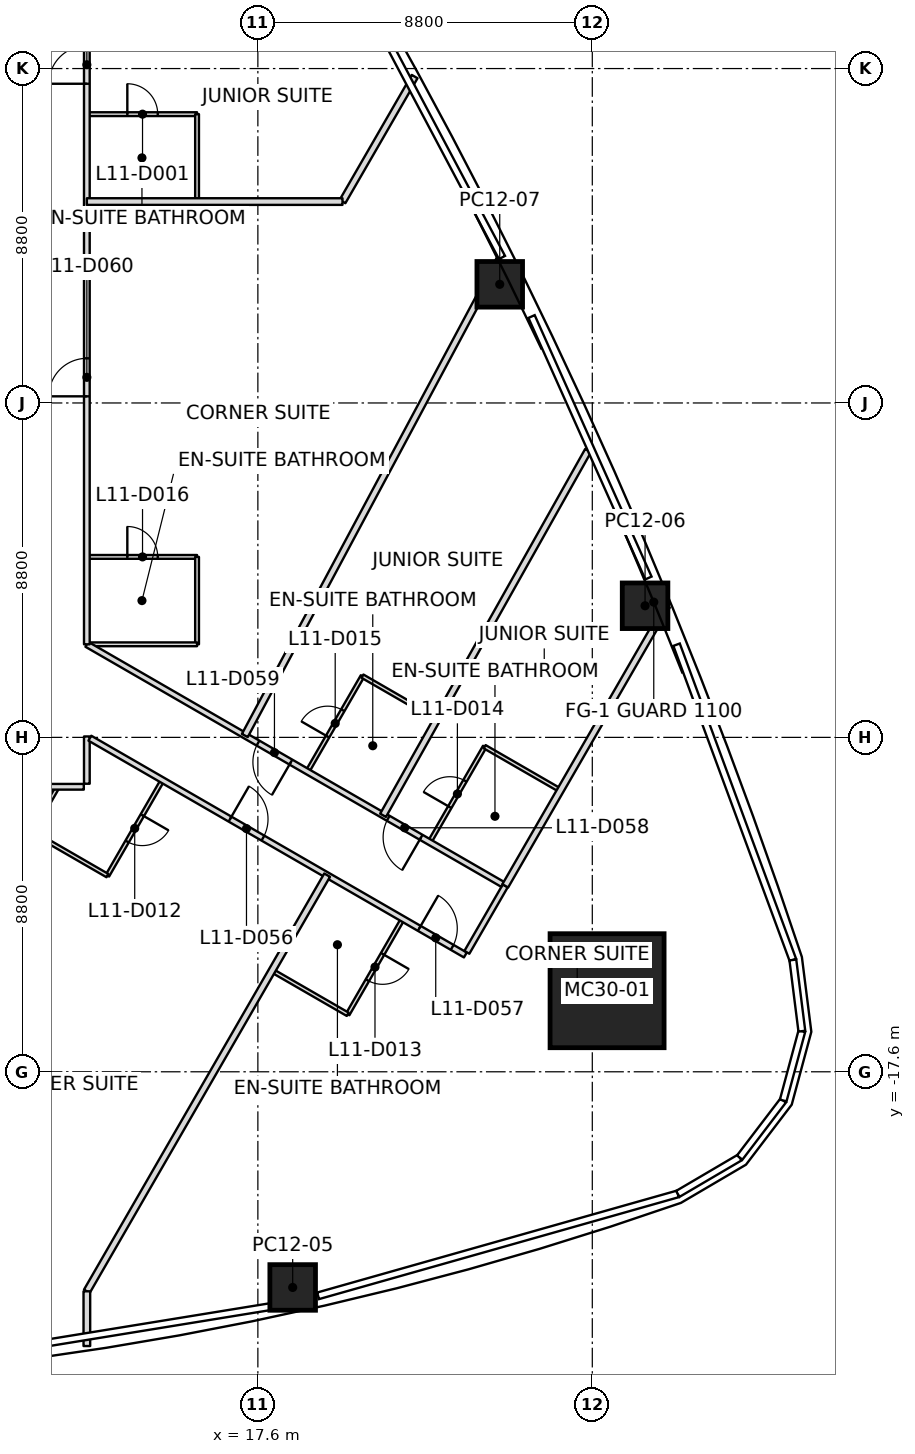
"""IFC4 building model, lengths in metres.
Left out: names, types, materials, properties, quantities, classifications, styles, units other than length and angle.
Written with IfcOpenShell. Run it as: python <this file> out.ifc"""

import sys

from ifc_helpers import new_model, si_unit, direction, frame, frame_2d, origin, origin_2d, place, context, subcontext, project, spatial, rectangle, extrude, clip, halfspace, element, fill, save


model = new_model("IFC4")
c1 = context("Model", 3, precision=1e-05, world=origin(), true_north=direction((0.0, 1.0)))
c2 = subcontext(c1, "Body", "Model", "MODEL_VIEW")
j1 = project(units=[si_unit("LENGTHUNIT", "METRE"), si_unit("PLANEANGLEUNIT", "RADIAN")], contexts=[c1])
p1 = place(None, origin())
s1 = spatial("IfcSite", under=j1, at=p1, CompositionType="ELEMENT")
p2 = place(p1, origin())
s2 = spatial("IfcBuilding", under=s1, at=p2, CompositionType="ELEMENT")
p3 = place(p2, frame((0.0, 0.0, 62.8)))
s3 = spatial("IfcBuildingStorey", under=s2, at=p3, CompositionType="ELEMENT", Elevation=62.8)
p4 = place(p3, frame((26.789, -15.467, 0.0), z_axis=(-0.030531992032, 0.017607001884, 0.999378702468), x_axis=(0.999533790055, 0.000537827582, 0.03052725469)))
e1 = element("IfcColumn", 1, at=p4, inside=s3, PredefinedType="COLUMN", context=c2, shape_type="SweptSolid", body=[
    extrude(rectangle(XDim=3.0, YDim=3.0, at=origin_2d()), origin(), (0.0, 0.0, 1.0), 3.702),
])
p5 = place(p3, frame((18.516, -23.275, 0.0), z_axis=(-0.019035359056, 0.17391691533, 0.98457633613), x_axis=(0.976521539024, 0.214578146302, -0.019023747061)))
e2 = element("IfcColumn", 2, at=p5, inside=s3, PredefinedType="COLUMN", context=c2, shape_type="SweptSolid", body=[
    clip(clip(extrude(rectangle(XDim=1.2, YDim=1.2, at=origin_2d()), origin(), (0.0, 0.0, 1.0), 3.758), halfspace(frame((0.0, 0.0, 0.0)), True)), halfspace(frame((0.0, 0.0, 3.752)), False)),
])
p6 = place(p3, frame((27.788, -5.337, 0.0), z_axis=(-0.019460655113, 0.011016709844, 0.999749926235), x_axis=(-0.381541837416, 0.924183792164, -0.017610922819)))
e3 = element("IfcColumn", 3, at=p6, inside=s3, PredefinedType="COLUMN", context=c2, shape_type="SweptSolid", body=[
    extrude(rectangle(XDim=1.2, YDim=1.2, at=origin_2d()), origin(), (0.0, 0.0, 1.0), 3.701),
])
p7 = place(p3, frame((23.965, 3.122, 0.0), z_axis=(-0.015372606146, 0.002309189764, 0.999879168011), x_axis=(-0.441716721862, 0.89711079847, -0.008863007202)))
e4 = element("IfcColumn", 4, at=p7, inside=s3, PredefinedType="COLUMN", context=c2, shape_type="SweptSolid", body=[
    extrude(rectangle(XDim=1.2, YDim=1.2, at=origin_2d()), origin(), (0.0, 0.0, 1.0), 3.7),
])
p8 = place(p3, frame((19.422, -12.426, 0.0), z_axis=(0.0, 0.0, 1.0), x_axis=(-0.499984848557, -0.866034151298, 0.0)))
e5 = element("IfcWall", 5, at=p8, inside=s3, PredefinedType="PARTITIONING", context=c2, shape_type="SweptSolid", body=[
    extrude(rectangle(XDim=12.645, YDim=0.175, at=frame_2d((6.323, 0.0))), origin(), (0.0, 0.0, 1.0), 2.934),
])
p9 = place(p3, frame((13.1, -23.377, 0.0), z_axis=(0.0, 0.0, 1.0), x_axis=(0.0, -1.0, 0.0)))
e6 = element("IfcWall", 6, at=p9, inside=s3, PredefinedType="PARTITIONING", context=c2, shape_type="SweptSolid", body=[
    extrude(rectangle(XDim=1.44, YDim=0.175, at=frame_2d((0.72, 0.0))), origin(), (0.0, 0.0, 1.0), 2.934),
])
p10 = place(p3, frame((21.726, 8.589, 0.0), z_axis=(0.0, 0.0, 1.0), x_axis=(-0.500024807712, -0.866011080572, 0.0)))
e7 = element("IfcWall", 7, at=p10, inside=s3, PredefinedType="PARTITIONING", context=c2, shape_type="SweptSolid", body=[
    extrude(rectangle(XDim=3.798, YDim=0.175, at=frame_2d((1.899, 0.0))), origin(), (0.0, 0.0, 1.0), 2.934),
])
p11 = place(p3, frame((19.827, 5.3, 0.0), z_axis=(0.0, 0.0, 1.0), x_axis=(-1.0, 0.0, 0.0)))
e8 = element("IfcWall", 8, at=p11, inside=s3, PredefinedType="PARTITIONING", context=c2, shape_type="SweptSolid", body=[
    extrude(rectangle(XDim=6.727, YDim=0.175, at=frame_2d((3.363, 0.0))), origin(), (0.0, 0.0, 1.0), 3.093),
])
p12 = place(p3, frame((17.257, -8.751, 0.0), z_axis=(0.0, 0.0, 1.0), x_axis=(0.471767248767, 0.881723121502, 0.0)))
e9 = element("IfcWall", 9, at=p12, inside=s3, PredefinedType="PARTITIONING", context=c2, shape_type="SweptSolid", body=[
    extrude(rectangle(XDim=14.203, YDim=0.175, at=frame_2d((7.102, 0.0))), origin(), (0.0, 0.0, 1.0), 2.947),
])
p13 = place(p3, frame((20.894, -10.851, 0.0), z_axis=(0.0, 0.0, 1.0), x_axis=(0.489970665473, 0.871738921338, 0.0)))
e10 = element("IfcWall", 10, at=p13, inside=s3, PredefinedType="PARTITIONING", context=c2, shape_type="SweptSolid", body=[
    extrude(rectangle(XDim=11.011, YDim=0.175, at=frame_2d((5.505, 0.0))), origin(), (0.0, 0.0, 1.0), 2.934),
])
p14 = place(p3, frame((24.11, -12.707, 0.0), z_axis=(0.0, 0.0, 1.0), x_axis=(0.500004040168, 0.86602307118, 0.0)))
e11 = element("IfcWall", 11, at=p14, inside=s3, PredefinedType="PARTITIONING", context=c2, shape_type="SweptSolid", body=[
    extrude(rectangle(XDim=8.506, YDim=0.175, at=frame_2d((4.253, 0.0))), origin(), (0.0, 0.0, 1.0), 2.934),
])
p15 = place(p3, frame((-13.02, -10.1, 0.0), z_axis=(0.0, 0.0, 1.0), x_axis=(1.0, 0.0, 0.0)))
e12 = element("IfcWall", 12, at=p15, inside=s3, PredefinedType="PARTITIONING", context=c2, shape_type="SweptSolid", body=[
    extrude(rectangle(XDim=26.04, YDim=0.15, at=frame_2d((13.02, 0.0))), origin(), (0.0, 0.0, 1.0), 2.947),
])
p16 = place(p15, frame((4.02, 0.0, 0.0)))
e13 = element("IfcOpeningElement", 13, at=p16, cuts=e12, PredefinedType="OPENING", context=c2, shape_type="SweptSolid", body=[
    extrude(rectangle(XDim=1.0, YDim=2.1, at=frame_2d((0.5, 1.05))), frame((0.0, 0.075, 0.0), z_axis=(0.0, -1.0, 0.0), x_axis=(1.0, 0.0, 0.0)), (0.0, 0.0, 1.0), 0.15),
])
p17 = place(p15, frame((7.02, 0.0, 0.0)))
e14 = element("IfcOpeningElement", 14, at=p17, cuts=e12, PredefinedType="OPENING", context=c2, shape_type="SweptSolid", body=[
    extrude(rectangle(XDim=1.0, YDim=2.1, at=frame_2d((0.5, 1.05))), frame((0.0, 0.075, 0.0), z_axis=(0.0, -1.0, 0.0), x_axis=(1.0, 0.0, 0.0)), (0.0, 0.0, 1.0), 0.15),
])
p18 = place(p15, frame((12.12, 0.0, 0.0)))
e15 = element("IfcOpeningElement", 15, at=p18, cuts=e12, PredefinedType="OPENING", context=c2, shape_type="SweptSolid", body=[
    extrude(rectangle(XDim=1.0, YDim=2.1, at=frame_2d((0.5, 1.05))), frame((0.0, 0.075, 0.0), z_axis=(0.0, -1.0, 0.0), x_axis=(1.0, 0.0, 0.0)), (0.0, 0.0, 1.0), 0.15),
])
p19 = place(p15, frame((16.62, 0.0, 0.0)))
e16 = element("IfcOpeningElement", 16, at=p19, cuts=e12, PredefinedType="OPENING", context=c2, shape_type="SweptSolid", body=[
    extrude(rectangle(XDim=1.0, YDim=2.1, at=frame_2d((0.5, 1.05))), frame((0.0, 0.075, 0.0), z_axis=(0.0, -1.0, 0.0), x_axis=(1.0, 0.0, 0.0)), (0.0, 0.0, 1.0), 0.15),
])
p20 = place(p15, frame((19.62, 0.0, 0.0)))
e17 = element("IfcOpeningElement", 17, at=p20, cuts=e12, PredefinedType="OPENING", context=c2, shape_type="SweptSolid", body=[
    extrude(rectangle(XDim=1.0, YDim=2.1, at=frame_2d((0.5, 1.05))), frame((0.0, 0.075, 0.0), z_axis=(0.0, -1.0, 0.0), x_axis=(1.0, 0.0, 0.0)), (0.0, 0.0, 1.0), 0.15),
])
p21 = place(p3, frame((13.1, -10.02, 0.0), z_axis=(0.0, 0.0, 1.0), x_axis=(0.0, 1.0, 0.0)))
e18 = element("IfcWall", 18, at=p21, inside=s3, PredefinedType="PARTITIONING", context=c2, shape_type="SweptSolid", body=[
    extrude(rectangle(XDim=1.244, YDim=0.15, at=frame_2d((0.622, 0.0))), origin(), (0.0, 0.0, 1.0), 2.797),
])
p22 = place(p3, frame((13.179, -8.822, 0.0), z_axis=(0.0, 0.0, 1.0), x_axis=(0.86603413911, -0.499984869667, 0.0)))
e19 = element("IfcWall", 19, at=p22, inside=s3, PredefinedType="PARTITIONING", context=c2, shape_type="SweptSolid", body=[
    extrude(rectangle(XDim=11.409, YDim=0.15, at=frame_2d((5.705, 0.0))), origin(), (0.0, 0.0, 1.0), 2.797),
])
p23 = place(p22, frame((4.259, 0.0, 0.0)))
e20 = element("IfcOpeningElement", 20, at=p23, cuts=e19, PredefinedType="OPENING", context=c2, shape_type="SweptSolid", body=[
    extrude(rectangle(XDim=1.0, YDim=2.1, at=frame_2d((0.5, 1.05))), frame((0.0, 0.075, 0.0), z_axis=(0.0, -1.0, 0.0), x_axis=(1.0, 0.0, 0.0)), (0.0, 0.0, 1.0), 0.15),
])
p24 = place(p22, frame((10.009, 0.0, 0.0)))
e21 = element("IfcOpeningElement", 21, at=p24, cuts=e19, PredefinedType="OPENING", context=c2, shape_type="SweptSolid", body=[
    extrude(rectangle(XDim=1.0, YDim=2.1, at=frame_2d((0.5, 1.05))), frame((0.0, 0.075, 0.0), z_axis=(0.0, -1.0, 0.0), x_axis=(1.0, 0.0, 0.0)), (0.0, 0.0, 1.0), 0.15),
])
p25 = place(p3, frame((23.1, -14.457, 0.0), z_axis=(0.0, 0.0, 1.0), x_axis=(0.500025864173, 0.866010470582, 0.0)))
e22 = element("IfcWall", 22, at=p25, inside=s3, PredefinedType="PARTITIONING", context=c2, shape_type="SweptSolid", body=[
    extrude(rectangle(XDim=2.02, YDim=0.15, at=frame_2d((1.01, 0.0))), origin(), (0.0, 0.0, 1.0), 2.797),
])
p26 = place(p3, frame((24.04, -12.667, 0.0), z_axis=(0.0, 0.0, 1.0), x_axis=(-0.866022415501, 0.500005175824, 0.0)))
e23 = element("IfcWall", 23, at=p26, inside=s3, PredefinedType="PARTITIONING", context=c2, shape_type="SweptSolid", body=[
    extrude(rectangle(XDim=12.633, YDim=0.15, at=frame_2d((6.316, 0.0))), origin(), (0.0, 0.0, 1.0), 2.947),
])
p27 = place(p26, frame((2.477, 0.0, 0.0)))
e24 = element("IfcOpeningElement", 24, at=p27, cuts=e23, PredefinedType="OPENING", context=c2, shape_type="SweptSolid", body=[
    extrude(rectangle(XDim=1.0, YDim=2.1, at=frame_2d((0.5, 1.05))), frame((0.0, 0.075, 0.0), z_axis=(0.0, -1.0, 0.0), x_axis=(1.0, 0.0, 0.0)), (0.0, 0.0, 1.0), 0.15),
])
p28 = place(p26, frame((6.433, 0.0, 0.0)))
e25 = element("IfcOpeningElement", 25, at=p28, cuts=e23, PredefinedType="OPENING", context=c2, shape_type="SweptSolid", body=[
    extrude(rectangle(XDim=1.0, YDim=2.1, at=frame_2d((0.5, 1.05))), frame((0.0, 0.075, 0.0), z_axis=(0.0, -1.0, 0.0), x_axis=(1.0, 0.0, 0.0)), (0.0, 0.0, 1.0), 0.15),
])
p29 = place(p3, frame((13.1, -6.351, 0.0), z_axis=(0.0, 0.0, 1.0), x_axis=(0.0, 1.0, 0.0)))
e26 = element("IfcWall", 26, at=p29, inside=s3, PredefinedType="PARTITIONING", context=c2, shape_type="SweptSolid", body=[
    extrude(rectangle(XDim=16.371, YDim=0.15, at=frame_2d((8.186, 0.0))), origin(), (0.0, 0.0, 1.0), 3.017),
])
p30 = place(p29, frame((14.751, 0.0, 0.0)))
e27 = element("IfcOpeningElement", 27, at=p30, cuts=e26, PredefinedType="OPENING", context=c2, shape_type="SweptSolid", body=[
    extrude(rectangle(XDim=1.0, YDim=2.1, at=frame_2d((0.5, 1.05))), frame((0.0, 0.075, 0.0), z_axis=(0.0, -1.0, 0.0), x_axis=(1.0, 0.0, 0.0)), (0.0, 0.0, 1.0), 0.15),
])
p31 = place(p29, frame((6.525, 0.0, 0.0)))
e28 = element("IfcOpeningElement", 28, at=p31, cuts=e26, PredefinedType="OPENING", context=c2, shape_type="SweptSolid", body=[
    extrude(rectangle(XDim=1.0, YDim=2.1, at=frame_2d((0.5, 1.05))), frame((0.0, 0.075, 0.0), z_axis=(0.0, -1.0, 0.0), x_axis=(1.0, 0.0, 0.0)), (0.0, 0.0, 1.0), 0.15),
])
p32 = place(p3, frame((15.077, -9.952, 0.0), z_axis=(0.0, 0.0, 1.0), x_axis=(-0.499999802827, -0.866025517622, 0.0)))
e29 = element("IfcWall", 29, at=p32, inside=s3, PredefinedType="PARTITIONING", context=c2, shape_type="SweptSolid", body=[
    extrude(rectangle(XDim=2.87, YDim=0.1, at=frame_2d((1.435, 0.0))), origin(), (0.0, 0.0, 1.0), 2.797),
])
p33 = place(p32, frame((1.035, 0.0, 0.0)))
e30 = element("IfcOpeningElement", 30, at=p33, cuts=e29, PredefinedType="OPENING", context=c2, shape_type="SweptSolid", body=[
    extrude(rectangle(XDim=0.8, YDim=2.1, at=frame_2d((0.4, 1.05))), frame((0.0, 0.05, 0.0), z_axis=(0.0, -1.0, 0.0), x_axis=(1.0, 0.0, 0.0)), (0.0, 0.0, 1.0), 0.1),
])
p34 = place(p3, frame((13.642, -12.437, 0.0), z_axis=(0.0, 0.0, 1.0), x_axis=(-0.866007057882, 0.500031774688, 0.0)))
e31 = element("IfcWall", 31, at=p34, inside=s3, PredefinedType="PARTITIONING", context=c2, shape_type="SweptSolid", body=[
    extrude(rectangle(XDim=2.3, YDim=0.1, at=frame_2d((1.15, 0.0))), origin(), (0.0, 0.0, 1.0), 2.947),
])
p35 = place(p3, frame((11.65, -11.287, 0.0), z_axis=(0.0, 0.0, 1.0), x_axis=(0.500049290317, 0.865996944136, 0.0)))
e32 = element("IfcWall", 32, at=p35, inside=s3, PredefinedType="PARTITIONING", context=c2, shape_type="SweptSolid", body=[
    extrude(rectangle(XDim=1.336, YDim=0.1, at=frame_2d((0.668, 0.0))), origin(), (0.0, 0.0, 1.0), 3.15),
])
p36 = place(p3, frame((13.13, -4.051, 0.0), z_axis=(0.0, 0.0, 1.0), x_axis=(1.0, 0.0, 0.0)))
e33 = element("IfcWall", 33, at=p36, inside=s3, PredefinedType="PARTITIONING", context=c2, shape_type="SweptSolid", body=[
    extrude(rectangle(XDim=2.87, YDim=0.1, at=frame_2d((1.435, 0.0))), origin(), (0.0, 0.0, 1.0), 3.15),
])
p37 = place(p36, frame((1.035, 0.0, 0.0)))
e34 = element("IfcOpeningElement", 34, at=p37, cuts=e33, PredefinedType="OPENING", context=c2, shape_type="SweptSolid", body=[
    extrude(rectangle(XDim=0.8, YDim=2.1, at=frame_2d((0.4, 1.05))), frame((0.0, 0.05, 0.0), z_axis=(0.0, -1.0, 0.0), x_axis=(1.0, 0.0, 0.0)), (0.0, 0.0, 1.0), 0.1),
])
p38 = place(p3, frame((16.0, -4.051, 0.0), z_axis=(0.0, 0.0, 1.0), x_axis=(0.0, -1.0, 0.0)))
e35 = element("IfcWall", 35, at=p38, inside=s3, PredefinedType="PARTITIONING", context=c2, shape_type="SweptSolid", body=[
    extrude(rectangle(XDim=2.3, YDim=0.1, at=frame_2d((1.15, 0.0))), origin(), (0.0, 0.0, 1.0), 2.947),
])
p39 = place(p3, frame((16.0, -6.351, 0.0), z_axis=(0.0, 0.0, 1.0), x_axis=(-1.0, 0.0, 0.0)))
e36 = element("IfcWall", 36, at=p39, inside=s3, PredefinedType="PARTITIONING", context=c2, shape_type="SweptSolid", body=[
    extrude(rectangle(XDim=2.84, YDim=0.1, at=frame_2d((1.42, 0.0))), origin(), (0.0, 0.0, 1.0), 2.947),
])
p40 = place(p3, frame((13.13, 7.6, 0.0), z_axis=(0.0, 0.0, 1.0), x_axis=(1.0, 0.0, 0.0)))
e37 = element("IfcWall", 37, at=p40, inside=s3, PredefinedType="PARTITIONING", context=c2, shape_type="SweptSolid", body=[
    extrude(rectangle(XDim=2.87, YDim=0.1, at=frame_2d((1.435, 0.0))), origin(), (0.0, 0.0, 1.0), 3.15),
])
p41 = place(p40, frame((1.035, 0.0, 0.0)))
e38 = element("IfcOpeningElement", 38, at=p41, cuts=e37, PredefinedType="OPENING", context=c2, shape_type="SweptSolid", body=[
    extrude(rectangle(XDim=0.8, YDim=2.1, at=frame_2d((0.4, 1.05))), frame((0.0, 0.05, 0.0), z_axis=(0.0, -1.0, 0.0), x_axis=(1.0, 0.0, 0.0)), (0.0, 0.0, 1.0), 0.1),
])
p42 = place(p3, frame((16.0, 7.6, 0.0), z_axis=(0.0, 0.0, 1.0), x_axis=(0.0, -1.0, 0.0)))
e39 = element("IfcWall", 39, at=p42, inside=s3, PredefinedType="PARTITIONING", context=c2, shape_type="SweptSolid", body=[
    extrude(rectangle(XDim=2.27, YDim=0.1, at=frame_2d((1.135, 0.0))), origin(), (0.0, 0.0, 1.0), 3.093),
])
p43 = place(p3, frame((21.399, -13.602, 0.0), z_axis=(0.0, 0.0, 1.0), x_axis=(-0.499999802827, -0.866025517622, 0.0)))
e40 = element("IfcWall", 40, at=p43, inside=s3, PredefinedType="PARTITIONING", context=c2, shape_type="SweptSolid", body=[
    extrude(rectangle(XDim=2.87, YDim=0.1, at=frame_2d((1.435, 0.0))), origin(), (0.0, 0.0, 1.0), 3.15),
])
p44 = place(p43, frame((1.035, 0.0, 0.0)))
e41 = element("IfcOpeningElement", 41, at=p44, cuts=e40, PredefinedType="OPENING", context=c2, shape_type="SweptSolid", body=[
    extrude(rectangle(XDim=0.8, YDim=2.1, at=frame_2d((0.4, 1.05))), frame((0.0, 0.05, 0.0), z_axis=(0.0, -1.0, 0.0), x_axis=(1.0, 0.0, 0.0)), (0.0, 0.0, 1.0), 0.1),
])
p45 = place(p3, frame((19.964, -16.087, 0.0), z_axis=(0.0, 0.0, 1.0), x_axis=(-0.866017224141, 0.500014167291, 0.0)))
e42 = element("IfcWall", 42, at=p45, inside=s3, PredefinedType="PARTITIONING", context=c2, shape_type="SweptSolid", body=[
    extrude(rectangle(XDim=2.27, YDim=0.1, at=frame_2d((1.135, 0.0))), origin(), (0.0, 0.0, 1.0), 3.15),
])
p46 = place(p3, frame((18.917, -9.675, 0.0), z_axis=(0.0, 0.0, 1.0), x_axis=(0.499972835562, 0.866041086612, 0.0)))
e43 = element("IfcWall", 43, at=p46, inside=s3, PredefinedType="PARTITIONING", context=c2, shape_type="SweptSolid", body=[
    extrude(rectangle(XDim=2.87, YDim=0.1, at=frame_2d((1.435, 0.0))), origin(), (0.0, 0.0, 1.0), 3.15),
])
p47 = place(p46, frame((1.035, 0.0, 0.0)))
e44 = element("IfcOpeningElement", 44, at=p47, cuts=e43, PredefinedType="OPENING", context=c2, shape_type="SweptSolid", body=[
    extrude(rectangle(XDim=0.8, YDim=2.1, at=frame_2d((0.4, 1.05))), frame((0.0, 0.05, 0.0), z_axis=(0.0, -1.0, 0.0), x_axis=(1.0, 0.0, 0.0)), (0.0, 0.0, 1.0), 0.1),
])
p48 = place(p3, frame((20.352, -7.189, 0.0), z_axis=(0.0, 0.0, 1.0), x_axis=(0.866017224141, -0.500014167291, 0.0)))
e45 = element("IfcWall", 45, at=p48, inside=s3, PredefinedType="PARTITIONING", context=c2, shape_type="SweptSolid", body=[
    extrude(rectangle(XDim=2.27, YDim=0.1, at=frame_2d((1.135, 0.0))), origin(), (0.0, 0.0, 1.0), 3.15),
])
p49 = place(p3, frame((22.133, -11.531, 0.0), z_axis=(0.0, 0.0, 1.0), x_axis=(0.500036638401, 0.866004249561, 0.0)))
e46 = element("IfcWall", 46, at=p49, inside=s3, PredefinedType="PARTITIONING", context=c2, shape_type="SweptSolid", body=[
    extrude(rectangle(XDim=2.87, YDim=0.1, at=frame_2d((1.435, 0.0))), origin(), (0.0, 0.0, 1.0), 3.15),
])
p50 = place(p49, frame((1.035, 0.0, 0.0)))
e47 = element("IfcOpeningElement", 47, at=p50, cuts=e46, PredefinedType="OPENING", context=c2, shape_type="SweptSolid", body=[
    extrude(rectangle(XDim=0.8, YDim=2.1, at=frame_2d((0.4, 1.05))), frame((0.0, 0.05, 0.0), z_axis=(0.0, -1.0, 0.0), x_axis=(1.0, 0.0, 0.0)), (0.0, 0.0, 1.0), 0.1),
])
p51 = place(p3, frame((23.568, -9.046, 0.0), z_axis=(0.0, 0.0, 1.0), x_axis=(0.866017224141, -0.500014167291, 0.0)))
e48 = element("IfcWall", 48, at=p51, inside=s3, PredefinedType="PARTITIONING", context=c2, shape_type="SweptSolid", body=[
    extrude(rectangle(XDim=2.27, YDim=0.1, at=frame_2d((1.135, 0.0))), origin(), (0.0, 0.0, 1.0), 3.15),
])
p52 = place(p30, origin())
e49 = element("IfcDoor", 49, at=p52, inside=s3, OperationType="SINGLE_SWING_LEFT", PredefinedType="DOOR", context=c2, shape_type="SweptSolid", body=[
    extrude(rectangle(XDim=1.0, YDim=2.1, at=frame_2d((0.5, 1.05))), frame((0.0, 0.025, 0.0), z_axis=(0.0, -1.0, 0.0), x_axis=(1.0, 0.0, 0.0)), (0.0, 0.0, 1.0), 0.05),
])
fill(e27, e49)
p53 = place(p41, origin())
e50 = element("IfcDoor", 50, at=p53, inside=s3, OperationType="SINGLE_SWING_LEFT", PredefinedType="DOOR", context=c2, shape_type="SweptSolid", body=[
    extrude(rectangle(XDim=0.8, YDim=2.1, at=frame_2d((0.4, 1.05))), frame((0.0, 0.025, 0.0), z_axis=(0.0, -1.0, 0.0), x_axis=(1.0, 0.0, 0.0)), (0.0, 0.0, 1.0), 0.05),
])
fill(e38, e50)
p54 = place(p23, origin())
e51 = element("IfcDoor", 51, at=p54, inside=s3, OperationType="SINGLE_SWING_LEFT", PredefinedType="DOOR", context=c2, shape_type="SweptSolid", body=[
    extrude(rectangle(XDim=1.0, YDim=2.1, at=frame_2d((0.5, 1.05))), frame((0.0, 0.025, 0.0), z_axis=(0.0, -1.0, 0.0), x_axis=(1.0, 0.0, 0.0)), (0.0, 0.0, 1.0), 0.05),
])
fill(e20, e51)
p55 = place(p33, origin())
e52 = element("IfcDoor", 52, at=p55, inside=s3, OperationType="SINGLE_SWING_RIGHT", PredefinedType="DOOR", context=c2, shape_type="SweptSolid", body=[
    extrude(rectangle(XDim=0.8, YDim=2.1, at=frame_2d((0.4, 1.05))), frame((0.0, 0.025, 0.0), z_axis=(0.0, -1.0, 0.0), x_axis=(1.0, 0.0, 0.0)), (0.0, 0.0, 1.0), 0.05),
])
fill(e30, e52)
p56 = place(p24, origin())
e53 = element("IfcDoor", 53, at=p56, inside=s3, OperationType="SINGLE_SWING_RIGHT", PredefinedType="DOOR", context=c2, shape_type="SweptSolid", body=[
    extrude(rectangle(XDim=1.0, YDim=2.1, at=frame_2d((0.5, 1.05))), frame((0.0, 0.025, 0.0), z_axis=(0.0, -1.0, 0.0), x_axis=(1.0, 0.0, 0.0)), (0.0, 0.0, 1.0), 0.05),
])
fill(e21, e53)
p57 = place(p44, origin())
e54 = element("IfcDoor", 54, at=p57, inside=s3, OperationType="SINGLE_SWING_RIGHT", PredefinedType="DOOR", context=c2, shape_type="SweptSolid", body=[
    extrude(rectangle(XDim=0.8, YDim=2.1, at=frame_2d((0.4, 1.05))), frame((0.0, 0.025, 0.0), z_axis=(0.0, -1.0, 0.0), x_axis=(1.0, 0.0, 0.0)), (0.0, 0.0, 1.0), 0.05),
])
fill(e41, e54)
p58 = place(p27, origin())
e55 = element("IfcDoor", 55, at=p58, inside=s3, OperationType="SINGLE_SWING_LEFT", PredefinedType="DOOR", context=c2, shape_type="SweptSolid", body=[
    extrude(rectangle(XDim=1.0, YDim=2.1, at=frame_2d((0.5, 1.05))), frame((0.0, 0.025, 0.0), z_axis=(0.0, -1.0, 0.0), x_axis=(1.0, 0.0, 0.0)), (0.0, 0.0, 1.0), 0.05),
])
fill(e24, e55)
p59 = place(p50, origin())
e56 = element("IfcDoor", 56, at=p59, inside=s3, OperationType="SINGLE_SWING_RIGHT", PredefinedType="DOOR", context=c2, shape_type="SweptSolid", body=[
    extrude(rectangle(XDim=0.8, YDim=2.1, at=frame_2d((0.4, 1.05))), frame((0.0, 0.025, 0.0), z_axis=(0.0, -1.0, 0.0), x_axis=(1.0, 0.0, 0.0)), (0.0, 0.0, 1.0), 0.05),
])
fill(e47, e56)
p60 = place(p28, origin())
e57 = element("IfcDoor", 57, at=p60, inside=s3, OperationType="SINGLE_SWING_LEFT", PredefinedType="DOOR", context=c2, shape_type="SweptSolid", body=[
    extrude(rectangle(XDim=1.0, YDim=2.1, at=frame_2d((0.5, 1.05))), frame((0.0, 0.025, 0.0), z_axis=(0.0, -1.0, 0.0), x_axis=(1.0, 0.0, 0.0)), (0.0, 0.0, 1.0), 0.05),
])
fill(e25, e57)
p61 = place(p47, origin())
e58 = element("IfcDoor", 58, at=p61, inside=s3, OperationType="SINGLE_SWING_LEFT", PredefinedType="DOOR", context=c2, shape_type="SweptSolid", body=[
    extrude(rectangle(XDim=0.8, YDim=2.1, at=frame_2d((0.4, 1.05))), frame((0.0, 0.025, 0.0), z_axis=(0.0, -1.0, 0.0), x_axis=(1.0, 0.0, 0.0)), (0.0, 0.0, 1.0), 0.05),
])
fill(e44, e58)
p62 = place(p31, origin())
e59 = element("IfcDoor", 59, at=p62, inside=s3, OperationType="SINGLE_SWING_LEFT", PredefinedType="DOOR", context=c2, shape_type="SweptSolid", body=[
    extrude(rectangle(XDim=1.0, YDim=2.1, at=frame_2d((0.5, 1.05))), frame((0.0, 0.025, 0.0), z_axis=(0.0, -1.0, 0.0), x_axis=(1.0, 0.0, 0.0)), (0.0, 0.0, 1.0), 0.05),
])
fill(e28, e59)
p63 = place(p37, origin())
e60 = element("IfcDoor", 60, at=p63, inside=s3, OperationType="SINGLE_SWING_LEFT", PredefinedType="DOOR", context=c2, shape_type="SweptSolid", body=[
    extrude(rectangle(XDim=0.8, YDim=2.1, at=frame_2d((0.4, 1.05))), frame((0.0, 0.025, 0.0), z_axis=(0.0, -1.0, 0.0), x_axis=(1.0, 0.0, 0.0)), (0.0, 0.0, 1.0), 0.05),
])
fill(e34, e60)
save(model, sys.argv[1])
